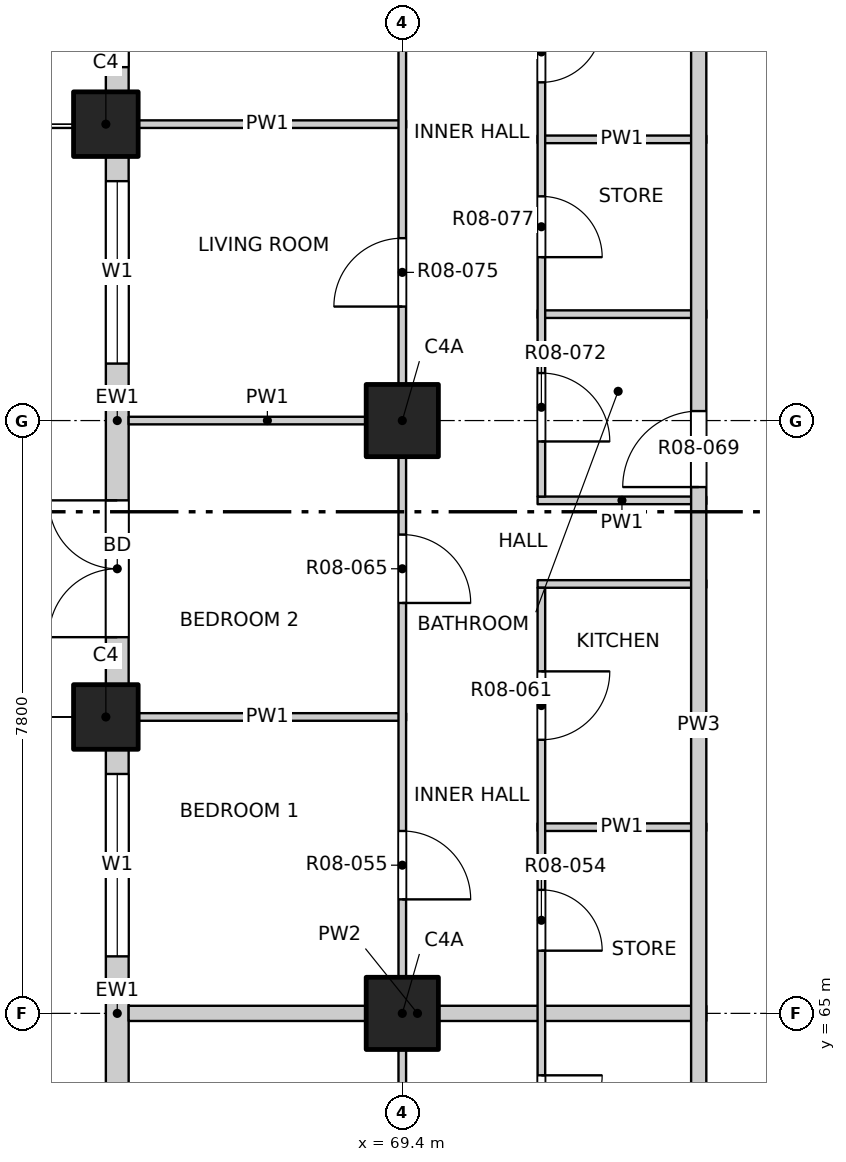
"""IFC4 building model, lengths in metres.
Left out: names, types, materials, properties, quantities, classifications, styles, units other than length and angle.
Written with IfcOpenShell. Run it as: python <this file> out.ifc"""

import sys

from ifc_helpers import new_model, si_unit, direction, frame, frame_2d, origin, origin_2d, place, context, subcontext, project, spatial, rectangle, extrude, element, fill, save


model = new_model("IFC4")
c1 = context("Model", 3, precision=1e-05, world=origin(), true_north=direction((0.0, 1.0)))
c2 = subcontext(c1, "Body", "Model", "MODEL_VIEW")
j1 = project(units=[si_unit("LENGTHUNIT", "METRE"), si_unit("PLANEANGLEUNIT", "RADIAN")], contexts=[c1])
p1 = place(None, origin())
s1 = spatial("IfcSite", under=j1, at=p1, CompositionType="ELEMENT")
p2 = place(p1, origin())
s2 = spatial("IfcBuilding", under=s1, at=p2, CompositionType="ELEMENT")
p3 = place(p2, frame((0.0, 0.0, 103.3)))
s3 = spatial("IfcBuildingStorey", under=s2, at=p3, CompositionType="ELEMENT", Elevation=103.3)
for number, where, z_axis, x_axis in (
    (1, (65.5, 68.9, -0.25), (0.0, 0.0, 1.0), (1.0, 0.0, 0.0)),
    (2, (65.5, 76.7, -0.25), (0.0, 0.0, 1.0), (1.0, 0.0, 0.0)),
):
    element("IfcColumn", number, at=place(p3, frame(where, z_axis=z_axis, x_axis=x_axis)), inside=s3, PredefinedType="COLUMN", context=c2, shape_type="SweptSolid", body=[
        extrude(rectangle(XDim=0.85, YDim=0.85, at=origin_2d()), origin(), (0.0, 0.0, 1.0), 3.4),
    ])
for number, where, z_axis, x_axis in (
    (3, (69.4, 65.0, -0.25), (0.0, 0.0, 1.0), (1.0, 0.0, 0.0)),
    (4, (69.4, 72.8, -0.25), (0.0, 0.0, 1.0), (1.0, 0.0, 0.0)),
):
    element("IfcColumn", number, at=place(p3, frame(where, z_axis=z_axis, x_axis=x_axis)), inside=s3, PredefinedType="COLUMN", context=c2, shape_type="SweptSolid", body=[
        extrude(rectangle(XDim=0.95, YDim=0.95, at=origin_2d()), origin(), (0.0, 0.0, 1.0), 3.4),
    ])
p4 = place(p3, frame((65.65, 61.525, 0.0), z_axis=(0.0, 0.0, 1.0), x_axis=(0.0, 1.0, 0.0)))
e5 = element("IfcWall", 5, at=p4, inside=s3, PredefinedType="SOLIDWALL", context=c2, shape_type="SweptSolid", body=[
    extrude(rectangle(XDim=6.95, YDim=0.3, at=frame_2d((3.475, 0.0))), origin(), (0.0, 0.0, 1.0), 2.7),
])
p5 = place(p4, frame((0.625, 0.0, 0.0)))
e6 = element("IfcOpeningElement", 6, at=p5, cuts=e5, PredefinedType="OPENING", context=c2, shape_type="SweptSolid", body=[
    extrude(rectangle(XDim=1.8, YDim=2.4, at=frame_2d((0.9, 1.2))), frame((0.0, 0.16, 0.0), z_axis=(0.0, -1.0, 0.0), x_axis=(1.0, 0.0, 0.0)), (0.0, 0.0, 1.0), 0.32),
])
p6 = place(p4, frame((4.225, 0.0, 0.9)))
e7 = element("IfcOpeningElement", 7, at=p6, cuts=e5, PredefinedType="OPENING", context=c2, shape_type="SweptSolid", body=[
    extrude(rectangle(XDim=2.4, YDim=1.8, at=frame_2d((1.2, 0.9))), frame((0.0, 0.16, 0.0), z_axis=(0.0, -1.0, 0.0), x_axis=(1.0, 0.0, 0.0)), (0.0, 0.0, 1.0), 0.32),
])
p7 = place(p3, frame((65.65, 69.325, 0.0), z_axis=(0.0, 0.0, 1.0), x_axis=(0.0, 1.0, 0.0)))
e8 = element("IfcWall", 8, at=p7, inside=s3, PredefinedType="SOLIDWALL", context=c2, shape_type="SweptSolid", body=[
    extrude(rectangle(XDim=6.95, YDim=0.3, at=frame_2d((3.475, 0.0))), origin(), (0.0, 0.0, 1.0), 2.7),
])
p8 = place(p7, frame((0.625, 0.0, 0.0)))
e9 = element("IfcOpeningElement", 9, at=p8, cuts=e8, PredefinedType="OPENING", context=c2, shape_type="SweptSolid", body=[
    extrude(rectangle(XDim=1.8, YDim=2.4, at=frame_2d((0.9, 1.2))), frame((0.0, 0.16, 0.0), z_axis=(0.0, -1.0, 0.0), x_axis=(1.0, 0.0, 0.0)), (0.0, 0.0, 1.0), 0.32),
])
p9 = place(p7, frame((4.225, 0.0, 0.9)))
e10 = element("IfcOpeningElement", 10, at=p9, cuts=e8, PredefinedType="OPENING", context=c2, shape_type="SweptSolid", body=[
    extrude(rectangle(XDim=2.4, YDim=1.8, at=frame_2d((1.2, 0.9))), frame((0.0, 0.16, 0.0), z_axis=(0.0, -1.0, 0.0), x_axis=(1.0, 0.0, 0.0)), (0.0, 0.0, 1.0), 0.32),
])
p10 = place(p3, frame((65.65, 77.125, 0.0), z_axis=(0.0, 0.0, 1.0), x_axis=(0.0, 1.0, 0.0)))
e11 = element("IfcWall", 11, at=p10, inside=s3, PredefinedType="SOLIDWALL", context=c2, shape_type="SweptSolid", body=[
    extrude(rectangle(XDim=3.475, YDim=0.3, at=frame_2d((1.738, 0.0))), origin(), (0.0, 0.0, 1.0), 2.7),
])
p11 = place(p10, frame((0.325, 0.0, 0.9)))
e12 = element("IfcOpeningElement", 12, at=p11, cuts=e11, PredefinedType="OPENING", context=c2, shape_type="SweptSolid", body=[
    extrude(rectangle(XDim=2.4, YDim=1.8, at=frame_2d((1.2, 0.9))), frame((0.0, 0.16, 0.0), z_axis=(0.0, -1.0, 0.0), x_axis=(1.0, 0.0, 0.0)), (0.0, 0.0, 1.0), 0.32),
])
p12 = place(p3, frame((65.8, 65.0, 0.0), z_axis=(0.0, 0.0, 1.0), x_axis=(1.0, 0.0, 0.0)))
e13 = element("IfcWall", 13, at=p12, inside=s3, PredefinedType="PARTITIONING", context=c2, shape_type="SweptSolid", body=[
    extrude(rectangle(XDim=7.6, YDim=0.2, at=frame_2d((3.8, 0.0))), origin(), (0.0, 0.0, 1.0), 3.15),
])
p13 = place(p3, frame((71.18, 67.45, 0.0), z_axis=(0.0, 0.0, 1.0), x_axis=(1.0, 0.0, 0.0)))
e14 = element("IfcWall", 14, at=p13, inside=s3, PredefinedType="PARTITIONING", context=c2, shape_type="SweptSolid", body=[
    extrude(rectangle(XDim=2.22, YDim=0.1, at=frame_2d((1.11, 0.0))), origin(), (0.0, 0.0, 1.0), 3.15),
])
p14 = place(p3, frame((65.8, 68.9, 0.0), z_axis=(0.0, 0.0, 1.0), x_axis=(1.0, 0.0, 0.0)))
e15 = element("IfcWall", 15, at=p14, inside=s3, PredefinedType="PARTITIONING", context=c2, shape_type="SweptSolid", body=[
    extrude(rectangle(XDim=3.65, YDim=0.1, at=frame_2d((1.825, 0.0))), origin(), (0.0, 0.0, 1.0), 2.55),
])
for number, where, z_axis, x_axis in (
    (16, (71.18, 70.65, 0.0), (0.0, 0.0, 1.0), (1.0, 0.0, 0.0)),
    (17, (71.18, 71.75, 0.0), (0.0, 0.0, 1.0), (1.0, 0.0, 0.0)),
):
    element("IfcWall", number, at=place(p3, frame(where, z_axis=z_axis, x_axis=x_axis)), inside=s3, PredefinedType="PARTITIONING", context=c2, shape_type="SweptSolid", body=[
        extrude(rectangle(XDim=2.22, YDim=0.1, at=frame_2d((1.11, 0.0))), origin(), (0.0, 0.0, 1.0), 3.15),
    ])
p15 = place(p3, frame((65.8, 72.8, 0.0), z_axis=(0.0, 0.0, 1.0), x_axis=(1.0, 0.0, 0.0)))
e18 = element("IfcWall", 18, at=p15, inside=s3, PredefinedType="PARTITIONING", context=c2, shape_type="SweptSolid", body=[
    extrude(rectangle(XDim=3.65, YDim=0.1, at=frame_2d((1.825, 0.0))), origin(), (0.0, 0.0, 1.0), 3.15),
])
p16 = place(p3, frame((71.18, 74.2, 0.0), z_axis=(0.0, 0.0, 1.0), x_axis=(1.0, 0.0, 0.0)))
e19 = element("IfcWall", 19, at=p16, inside=s3, PredefinedType="PARTITIONING", context=c2, shape_type="SweptSolid", body=[
    extrude(rectangle(XDim=2.22, YDim=0.1, at=frame_2d((1.11, 0.0))), origin(), (0.0, 0.0, 1.0), 3.15),
])
p17 = place(p3, frame((71.18, 76.5, 0.0), z_axis=(0.0, 0.0, 1.0), x_axis=(1.0, 0.0, 0.0)))
e20 = element("IfcWall", 20, at=p17, inside=s3, PredefinedType="PARTITIONING", context=c2, shape_type="SweptSolid", body=[
    extrude(rectangle(XDim=2.22, YDim=0.1, at=frame_2d((1.11, 0.0))), origin(), (0.0, 0.0, 1.0), 2.55),
])
p18 = place(p3, frame((65.8, 76.7, 0.0), z_axis=(0.0, 0.0, 1.0), x_axis=(1.0, 0.0, 0.0)))
e21 = element("IfcWall", 21, at=p18, inside=s3, PredefinedType="PARTITIONING", context=c2, shape_type="SweptSolid", body=[
    extrude(rectangle(XDim=3.65, YDim=0.1, at=frame_2d((1.825, 0.0))), origin(), (0.0, 0.0, 1.0), 2.55),
])
p19 = place(p3, frame((69.4, 45.8, 0.0), z_axis=(0.0, 0.0, 1.0), x_axis=(0.0, 1.0, 0.0)))
e22 = element("IfcWall", 22, at=p19, inside=s3, PredefinedType="PARTITIONING", context=c2, shape_type="SweptSolid", body=[
    extrude(rectangle(XDim=38.4, YDim=0.1, at=frame_2d((19.2, 0.0))), origin(), (0.0, 0.0, 1.0), 3.15),
])
p20 = place(p19, frame((1.05, 0.0, 0.0)))
e23 = element("IfcOpeningElement", 23, at=p20, cuts=e22, PredefinedType="OPENING", context=c2, shape_type="SweptSolid", body=[
    extrude(rectangle(XDim=1.2, YDim=2.1, at=frame_2d((0.6, 1.05))), frame((0.0, 0.06, 0.0), z_axis=(0.0, -1.0, 0.0), x_axis=(1.0, 0.0, 0.0)), (0.0, 0.0, 1.0), 0.12),
])
p21 = place(p19, frame((5.1, 0.0, 0.0)))
e24 = element("IfcOpeningElement", 24, at=p21, cuts=e22, PredefinedType="OPENING", context=c2, shape_type="SweptSolid", body=[
    extrude(rectangle(XDim=0.9, YDim=2.1, at=frame_2d((0.45, 1.05))), frame((0.0, 0.06, 0.0), z_axis=(0.0, -1.0, 0.0), x_axis=(1.0, 0.0, 0.0)), (0.0, 0.0, 1.0), 0.12),
])
p22 = place(p19, frame((9.0, 0.0, 0.0)))
e25 = element("IfcOpeningElement", 25, at=p22, cuts=e22, PredefinedType="OPENING", context=c2, shape_type="SweptSolid", body=[
    extrude(rectangle(XDim=0.9, YDim=2.1, at=frame_2d((0.45, 1.05))), frame((0.0, 0.06, 0.0), z_axis=(0.0, -1.0, 0.0), x_axis=(1.0, 0.0, 0.0)), (0.0, 0.0, 1.0), 0.12),
])
p23 = place(p19, frame((12.9, 0.0, 0.0)))
e26 = element("IfcOpeningElement", 26, at=p23, cuts=e22, PredefinedType="OPENING", context=c2, shape_type="SweptSolid", body=[
    extrude(rectangle(XDim=0.9, YDim=2.1, at=frame_2d((0.45, 1.05))), frame((0.0, 0.06, 0.0), z_axis=(0.0, -1.0, 0.0), x_axis=(1.0, 0.0, 0.0)), (0.0, 0.0, 1.0), 0.12),
])
p24 = place(p19, frame((16.8, 0.0, 0.0)))
e27 = element("IfcOpeningElement", 27, at=p24, cuts=e22, PredefinedType="OPENING", context=c2, shape_type="SweptSolid", body=[
    extrude(rectangle(XDim=0.9, YDim=2.1, at=frame_2d((0.45, 1.05))), frame((0.0, 0.06, 0.0), z_axis=(0.0, -1.0, 0.0), x_axis=(1.0, 0.0, 0.0)), (0.0, 0.0, 1.0), 0.12),
])
p25 = place(p19, frame((20.7, 0.0, 0.0)))
e28 = element("IfcOpeningElement", 28, at=p25, cuts=e22, PredefinedType="OPENING", context=c2, shape_type="SweptSolid", body=[
    extrude(rectangle(XDim=0.9, YDim=2.1, at=frame_2d((0.45, 1.05))), frame((0.0, 0.06, 0.0), z_axis=(0.0, -1.0, 0.0), x_axis=(1.0, 0.0, 0.0)), (0.0, 0.0, 1.0), 0.12),
])
p26 = place(p19, frame((24.6, 0.0, 0.0)))
e29 = element("IfcOpeningElement", 29, at=p26, cuts=e22, PredefinedType="OPENING", context=c2, shape_type="SweptSolid", body=[
    extrude(rectangle(XDim=0.9, YDim=2.1, at=frame_2d((0.45, 1.05))), frame((0.0, 0.06, 0.0), z_axis=(0.0, -1.0, 0.0), x_axis=(1.0, 0.0, 0.0)), (0.0, 0.0, 1.0), 0.12),
])
p27 = place(p19, frame((28.5, 0.0, 0.0)))
e30 = element("IfcOpeningElement", 30, at=p27, cuts=e22, PredefinedType="OPENING", context=c2, shape_type="SweptSolid", body=[
    extrude(rectangle(XDim=0.9, YDim=2.1, at=frame_2d((0.45, 1.05))), frame((0.0, 0.06, 0.0), z_axis=(0.0, -1.0, 0.0), x_axis=(1.0, 0.0, 0.0)), (0.0, 0.0, 1.0), 0.12),
])
p28 = place(p19, frame((32.4, 0.0, 0.0)))
e31 = element("IfcOpeningElement", 31, at=p28, cuts=e22, PredefinedType="OPENING", context=c2, shape_type="SweptSolid", body=[
    extrude(rectangle(XDim=0.9, YDim=2.1, at=frame_2d((0.45, 1.05))), frame((0.0, 0.06, 0.0), z_axis=(0.0, -1.0, 0.0), x_axis=(1.0, 0.0, 0.0)), (0.0, 0.0, 1.0), 0.12),
])
p29 = place(p19, frame((36.15, 0.0, 0.0)))
e32 = element("IfcOpeningElement", 32, at=p29, cuts=e22, PredefinedType="OPENING", context=c2, shape_type="SweptSolid", body=[
    extrude(rectangle(XDim=1.2, YDim=2.1, at=frame_2d((0.6, 1.05))), frame((0.0, 0.06, 0.0), z_axis=(0.0, -1.0, 0.0), x_axis=(1.0, 0.0, 0.0)), (0.0, 0.0, 1.0), 0.12),
])
p30 = place(p3, frame((71.23, 59.7, 0.0), z_axis=(0.0, 0.0, 1.0), x_axis=(0.0, 1.0, 0.0)))
e33 = element("IfcWall", 33, at=p30, inside=s3, PredefinedType="PARTITIONING", context=c2, shape_type="SweptSolid", body=[
    extrude(rectangle(XDim=10.9, YDim=0.1, at=frame_2d((5.45, 0.0))), origin(), (0.0, 0.0, 1.0), 3.15),
])
p31 = place(p30, frame((0.96, 0.0, 0.0)))
e34 = element("IfcOpeningElement", 34, at=p31, cuts=e33, PredefinedType="OPENING", context=c2, shape_type="SweptSolid", body=[
    extrude(rectangle(XDim=0.9, YDim=2.1, at=frame_2d((0.45, 1.05))), frame((0.0, 0.06, 0.0), z_axis=(0.0, -1.0, 0.0), x_axis=(1.0, 0.0, 0.0)), (0.0, 0.0, 1.0), 0.12),
])
p32 = place(p30, frame((3.685, 0.0, 0.0)))
e35 = element("IfcOpeningElement", 35, at=p32, cuts=e33, PredefinedType="OPENING", context=c2, shape_type="SweptSolid", body=[
    extrude(rectangle(XDim=0.8, YDim=2.1, at=frame_2d((0.4, 1.05))), frame((0.0, 0.06, 0.0), z_axis=(0.0, -1.0, 0.0), x_axis=(1.0, 0.0, 0.0)), (0.0, 0.0, 1.0), 0.12),
])
p33 = place(p30, frame((6.125, 0.0, 0.0)))
e36 = element("IfcOpeningElement", 36, at=p33, cuts=e33, PredefinedType="OPENING", context=c2, shape_type="SweptSolid", body=[
    extrude(rectangle(XDim=0.8, YDim=2.1, at=frame_2d((0.4, 1.05))), frame((0.0, 0.06, 0.0), z_axis=(0.0, -1.0, 0.0), x_axis=(1.0, 0.0, 0.0)), (0.0, 0.0, 1.0), 0.12),
])
p34 = place(p30, frame((8.9, 0.0, 0.0)))
e37 = element("IfcOpeningElement", 37, at=p34, cuts=e33, PredefinedType="OPENING", context=c2, shape_type="SweptSolid", body=[
    extrude(rectangle(XDim=0.9, YDim=2.1, at=frame_2d((0.45, 1.05))), frame((0.0, 0.06, 0.0), z_axis=(0.0, -1.0, 0.0), x_axis=(1.0, 0.0, 0.0)), (0.0, 0.0, 1.0), 0.12),
])
p35 = place(p3, frame((71.23, 71.8, 0.0), z_axis=(0.0, 0.0, 1.0), x_axis=(0.0, 1.0, 0.0)))
e38 = element("IfcWall", 38, at=p35, inside=s3, PredefinedType="PARTITIONING", context=c2, shape_type="SweptSolid", body=[
    extrude(rectangle(XDim=8.75, YDim=0.1, at=frame_2d((4.375, 0.0))), origin(), (0.0, 0.0, 1.0), 3.15),
])
p36 = place(p35, frame((0.725, 0.0, 0.0)))
e39 = element("IfcOpeningElement", 39, at=p36, cuts=e38, PredefinedType="OPENING", context=c2, shape_type="SweptSolid", body=[
    extrude(rectangle(XDim=0.9, YDim=2.1, at=frame_2d((0.45, 1.05))), frame((0.0, 0.06, 0.0), z_axis=(0.0, -1.0, 0.0), x_axis=(1.0, 0.0, 0.0)), (0.0, 0.0, 1.0), 0.12),
])
p37 = place(p35, frame((3.15, 0.0, 0.0)))
e40 = element("IfcOpeningElement", 40, at=p37, cuts=e38, PredefinedType="OPENING", context=c2, shape_type="SweptSolid", body=[
    extrude(rectangle(XDim=0.8, YDim=2.1, at=frame_2d((0.4, 1.05))), frame((0.0, 0.06, 0.0), z_axis=(0.0, -1.0, 0.0), x_axis=(1.0, 0.0, 0.0)), (0.0, 0.0, 1.0), 0.12),
])
p38 = place(p35, frame((5.45, 0.0, 0.0)))
e41 = element("IfcOpeningElement", 41, at=p38, cuts=e38, PredefinedType="OPENING", context=c2, shape_type="SweptSolid", body=[
    extrude(rectangle(XDim=0.8, YDim=2.1, at=frame_2d((0.4, 1.05))), frame((0.0, 0.06, 0.0), z_axis=(0.0, -1.0, 0.0), x_axis=(1.0, 0.0, 0.0)), (0.0, 0.0, 1.0), 0.12),
])
p39 = place(p35, frame((7.45, 0.0, 0.0)))
e42 = element("IfcOpeningElement", 42, at=p39, cuts=e38, PredefinedType="OPENING", context=c2, shape_type="SweptSolid", body=[
    extrude(rectangle(XDim=0.9, YDim=2.1, at=frame_2d((0.45, 1.05))), frame((0.0, 0.06, 0.0), z_axis=(0.0, -1.0, 0.0), x_axis=(1.0, 0.0, 0.0)), (0.0, 0.0, 1.0), 0.12),
])
p40 = place(p3, frame((73.3, 53.4, 0.0), z_axis=(0.0, 0.0, 1.0), x_axis=(0.0, 1.0, 0.0)))
e43 = element("IfcWall", 43, at=p40, inside=s3, PredefinedType="PARTITIONING", context=c2, shape_type="SweptSolid", body=[
    extrude(rectangle(XDim=30.8, YDim=0.2, at=frame_2d((15.4, 0.0))), origin(), (0.0, 0.0, 1.0), 3.15),
])
p41 = place(p40, frame((6.425, 0.0, 0.0)))
e44 = element("IfcOpeningElement", 44, at=p41, cuts=e43, PredefinedType="OPENING", context=c2, shape_type="SweptSolid", body=[
    extrude(rectangle(XDim=1.0, YDim=2.1, at=frame_2d((0.5, 1.05))), frame((0.0, 0.11, 0.0), z_axis=(0.0, -1.0, 0.0), x_axis=(1.0, 0.0, 0.0)), (0.0, 0.0, 1.0), 0.22),
])
p42 = place(p40, frame((18.525, 0.0, 0.0)))
e45 = element("IfcOpeningElement", 45, at=p42, cuts=e43, PredefinedType="OPENING", context=c2, shape_type="SweptSolid", body=[
    extrude(rectangle(XDim=1.0, YDim=2.1, at=frame_2d((0.5, 1.05))), frame((0.0, 0.11, 0.0), z_axis=(0.0, -1.0, 0.0), x_axis=(1.0, 0.0, 0.0)), (0.0, 0.0, 1.0), 0.22),
])
p43 = place(p6, origin())
e46 = element("IfcWindow", 46, at=p43, inside=s3, PartitioningType="DOUBLE_PANEL_VERTICAL", PredefinedType="WINDOW", context=c2, shape_type="SweptSolid", body=[
    extrude(rectangle(XDim=2.4, YDim=1.8, at=frame_2d((1.2, 0.9))), frame((0.0, 0.03, 0.0), z_axis=(0.0, -1.0, 0.0), x_axis=(1.0, 0.0, 0.0)), (0.0, 0.0, 1.0), 0.06),
])
fill(e7, e46)
p44 = place(p8, origin())
e47 = element("IfcDoor", 47, at=p44, inside=s3, OperationType="DOUBLE_DOOR_SINGLE_SWING", PredefinedType="DOOR", context=c2, shape_type="SweptSolid", body=[
    extrude(rectangle(XDim=1.8, YDim=2.4, at=frame_2d((0.9, 1.2))), frame((0.0, 0.025, 0.0), z_axis=(0.0, -1.0, 0.0), x_axis=(1.0, 0.0, 0.0)), (0.0, 0.0, 1.0), 0.05),
])
fill(e9, e47)
p45 = place(p9, origin())
e48 = element("IfcWindow", 48, at=p45, inside=s3, PartitioningType="DOUBLE_PANEL_VERTICAL", PredefinedType="WINDOW", context=c2, shape_type="SweptSolid", body=[
    extrude(rectangle(XDim=2.4, YDim=1.8, at=frame_2d((1.2, 0.9))), frame((0.0, 0.03, 0.0), z_axis=(0.0, -1.0, 0.0), x_axis=(1.0, 0.0, 0.0)), (0.0, 0.0, 1.0), 0.06),
])
fill(e10, e48)
p46 = place(p11, origin())
e49 = element("IfcWindow", 49, at=p46, inside=s3, PartitioningType="DOUBLE_PANEL_VERTICAL", PredefinedType="WINDOW", context=c2, shape_type="SweptSolid", body=[
    extrude(rectangle(XDim=2.4, YDim=1.8, at=frame_2d((1.2, 0.9))), frame((0.0, 0.03, 0.0), z_axis=(0.0, -1.0, 0.0), x_axis=(1.0, 0.0, 0.0)), (0.0, 0.0, 1.0), 0.06),
])
fill(e12, e49)
p47 = place(p32, origin())
e50 = element("IfcDoor", 50, at=p47, inside=s3, OperationType="SINGLE_SWING_LEFT", PredefinedType="DOOR", context=c2, shape_type="SweptSolid", body=[
    extrude(rectangle(XDim=0.8, YDim=2.1, at=frame_2d((0.4, 1.05))), frame((0.0, 0.025, 0.0), z_axis=(0.0, -1.0, 0.0), x_axis=(1.0, 0.0, 0.0)), (0.0, 0.0, 1.0), 0.05),
])
fill(e35, e50)
p48 = place(p33, origin())
e51 = element("IfcDoor", 51, at=p48, inside=s3, OperationType="SINGLE_SWING_RIGHT", PredefinedType="DOOR", context=c2, shape_type="SweptSolid", body=[
    extrude(rectangle(XDim=0.8, YDim=2.1, at=frame_2d((0.4, 1.05))), frame((0.0, 0.025, 0.0), z_axis=(0.0, -1.0, 0.0), x_axis=(1.0, 0.0, 0.0)), (0.0, 0.0, 1.0), 0.05),
])
fill(e36, e51)
p49 = place(p25, origin())
e52 = element("IfcDoor", 52, at=p49, inside=s3, OperationType="SINGLE_SWING_RIGHT", PredefinedType="DOOR", context=c2, shape_type="SweptSolid", body=[
    extrude(rectangle(XDim=0.9, YDim=2.1, at=frame_2d((0.45, 1.05))), frame((0.0, 0.025, 0.0), z_axis=(0.0, -1.0, 0.0), x_axis=(1.0, 0.0, 0.0)), (0.0, 0.0, 1.0), 0.05),
])
fill(e28, e52)
p50 = place(p34, origin())
e53 = element("IfcDoor", 53, at=p50, inside=s3, OperationType="SINGLE_SWING_LEFT", PredefinedType="DOOR", context=c2, shape_type="SweptSolid", body=[
    extrude(rectangle(XDim=0.9, YDim=2.1, at=frame_2d((0.45, 1.05))), frame((0.0, 0.025, 0.0), z_axis=(0.0, -1.0, 0.0), x_axis=(1.0, 0.0, 0.0)), (0.0, 0.0, 1.0), 0.05),
])
fill(e37, e53)
p51 = place(p26, origin())
e54 = element("IfcDoor", 54, at=p51, inside=s3, OperationType="SINGLE_SWING_RIGHT", PredefinedType="DOOR", context=c2, shape_type="SweptSolid", body=[
    extrude(rectangle(XDim=0.9, YDim=2.1, at=frame_2d((0.45, 1.05))), frame((0.0, 0.025, 0.0), z_axis=(0.0, -1.0, 0.0), x_axis=(1.0, 0.0, 0.0)), (0.0, 0.0, 1.0), 0.05),
])
fill(e29, e54)
p52 = place(p42, origin())
e55 = element("IfcDoor", 55, at=p52, inside=s3, OperationType="SINGLE_SWING_RIGHT", PredefinedType="DOOR", context=c2, shape_type="SweptSolid", body=[
    extrude(rectangle(XDim=1.0, YDim=2.1, at=frame_2d((0.5, 1.05))), frame((0.0, 0.025, 0.0), z_axis=(0.0, -1.0, 0.0), x_axis=(1.0, 0.0, 0.0)), (0.0, 0.0, 1.0), 0.05),
])
fill(e45, e55)
p53 = place(p36, origin())
e56 = element("IfcDoor", 56, at=p53, inside=s3, OperationType="SINGLE_SWING_RIGHT", PredefinedType="DOOR", context=c2, shape_type="SweptSolid", body=[
    extrude(rectangle(XDim=0.9, YDim=2.1, at=frame_2d((0.45, 1.05))), frame((0.0, 0.025, 0.0), z_axis=(0.0, -1.0, 0.0), x_axis=(1.0, 0.0, 0.0)), (0.0, 0.0, 1.0), 0.05),
])
fill(e39, e56)
p54 = place(p27, origin())
e57 = element("IfcDoor", 57, at=p54, inside=s3, OperationType="SINGLE_SWING_LEFT", PredefinedType="DOOR", context=c2, shape_type="SweptSolid", body=[
    extrude(rectangle(XDim=0.9, YDim=2.1, at=frame_2d((0.45, 1.05))), frame((0.0, 0.025, 0.0), z_axis=(0.0, -1.0, 0.0), x_axis=(1.0, 0.0, 0.0)), (0.0, 0.0, 1.0), 0.05),
])
fill(e30, e57)
p55 = place(p37, origin())
e58 = element("IfcDoor", 58, at=p55, inside=s3, OperationType="SINGLE_SWING_RIGHT", PredefinedType="DOOR", context=c2, shape_type="SweptSolid", body=[
    extrude(rectangle(XDim=0.8, YDim=2.1, at=frame_2d((0.4, 1.05))), frame((0.0, 0.025, 0.0), z_axis=(0.0, -1.0, 0.0), x_axis=(1.0, 0.0, 0.0)), (0.0, 0.0, 1.0), 0.05),
])
fill(e40, e58)
p56 = place(p38, origin())
e59 = element("IfcDoor", 59, at=p56, inside=s3, OperationType="SINGLE_SWING_LEFT", PredefinedType="DOOR", context=c2, shape_type="SweptSolid", body=[
    extrude(rectangle(XDim=0.8, YDim=2.1, at=frame_2d((0.4, 1.05))), frame((0.0, 0.025, 0.0), z_axis=(0.0, -1.0, 0.0), x_axis=(1.0, 0.0, 0.0)), (0.0, 0.0, 1.0), 0.05),
])
fill(e41, e59)
save(model, sys.argv[1])
